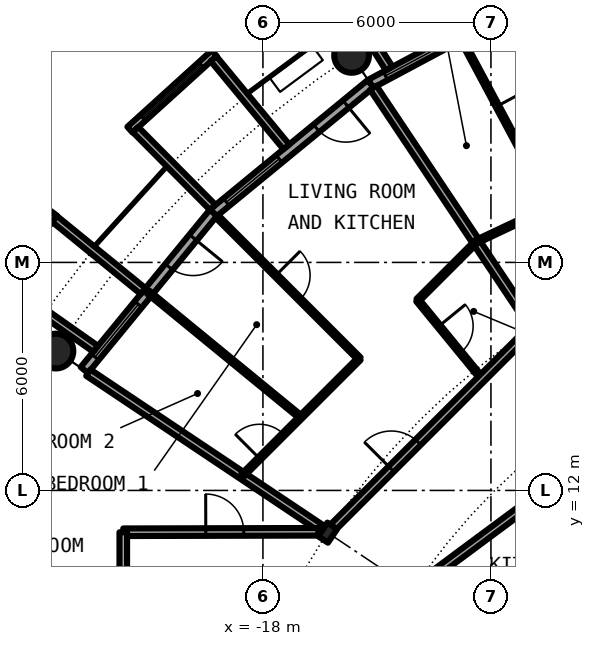
"""IFC4 building model, lengths in metres.
Left out: names, types, materials, properties, quantities, classifications, styles, units other than length and angle.
Written with IfcOpenShell. Run it as: python <this file> out.ifc"""

import sys

from ifc_helpers import new_model, si_unit, direction, frame, frame_2d, origin, origin_2d, place, context, subcontext, project, spatial, rectangle, circle, hollow_circle, i_section, extrude, element, fill, save


model = new_model("IFC4")
c1 = context("Model", 3, precision=1e-05, world=origin(), true_north=direction((0.0, 1.0)))
c2 = subcontext(c1, "Body", "Model", "MODEL_VIEW")
j1 = project(units=[si_unit("LENGTHUNIT", "METRE"), si_unit("PLANEANGLEUNIT", "RADIAN")], contexts=[c1])
p1 = place(None, origin())
s1 = spatial("IfcSite", under=j1, at=p1, CompositionType="ELEMENT")
p2 = place(p1, origin())
s2 = spatial("IfcBuilding", under=s1, at=p2, CompositionType="ELEMENT")
p3 = place(p2, frame((0.0, 0.0, 120.8)))
s3 = spatial("IfcBuildingStorey", under=s2, at=p3, CompositionType="ELEMENT", Elevation=120.8)
for number, where, z_axis, x_axis in (
    (1, (-15.667, 23.448, 0.0), (0.0, 0.0, 1.0), (1.0, 0.0, 0.0)),
    (2, (-23.448, 15.667, 0.0), (0.0, 0.0, 1.0), (1.0, 0.0, 0.0)),
):
    element("IfcColumn", number, at=place(p3, frame(where, z_axis=z_axis, x_axis=x_axis)), inside=s3, PredefinedType="COLUMN", context=c2, shape_type="SweptSolid", body=[
        extrude(hollow_circle(Radius=0.457, WallThickness=0.04, at=origin_2d()), origin(), (0.0, 0.0, 1.0), 3.05),
    ])
p4 = place(p3, frame((-16.297, 10.889, 0.0), z_axis=(0.0, 0.0, 1.0), x_axis=(-0.831469612303, 0.55557023302, 0.0)))
e3 = element("IfcColumn", 3, at=p4, inside=s3, PredefinedType="COLUMN", context=c2, shape_type="SweptSolid", body=[
    extrude(i_section(OverallWidth=0.307, OverallDepth=0.432, WebThickness=0.021, FlangeThickness=0.04, FilletRadius=0.027, at=origin_2d()), origin(), (0.0, 0.0, 1.0), 3.05),
])
p5 = place(p3, frame((-10.447, 25.222, 0.0), z_axis=(0.0, 0.0, 1.0), x_axis=(-0.881915646801, -0.471407246368, 0.0)))
e4 = element("IfcWall", 4, at=p5, inside=s3, PredefinedType="SOLIDWALL", context=c2, shape_type="SweptSolid", body=[
    extrude(rectangle(XDim=5.352, YDim=0.25, at=frame_2d((2.676, 0.0))), origin(), (0.0, 0.0, 1.0), 2.7),
])
p6 = place(p5, frame((0.841, 0.0, 0.0)))
e5 = element("IfcOpeningElement", 5, at=p6, cuts=e4, PredefinedType="OPENING", context=c2, shape_type="SweptSolid", body=[
    extrude(rectangle(XDim=1.0, YDim=2.2, at=frame_2d((0.5, 1.1))), frame((0.0, 0.135, 0.0), z_axis=(0.0, -1.0, 0.0), x_axis=(1.0, 0.0, 0.0)), (0.0, 0.0, 1.0), 0.27),
])
p7 = place(p5, frame((3.111, 0.0, 0.3)))
e6 = element("IfcOpeningElement", 6, at=p7, cuts=e4, PredefinedType="OPENING", context=c2, shape_type="SweptSolid", body=[
    extrude(rectangle(XDim=1.8, YDim=2.1, at=frame_2d((0.9, 1.05))), frame((0.0, 0.135, 0.0), z_axis=(0.0, -1.0, 0.0), x_axis=(1.0, 0.0, 0.0)), (0.0, 0.0, 1.0), 0.27),
])
p8 = place(p3, frame((-14.678, 23.102, -0.03), z_axis=(0.0, 0.0, 1.0), x_axis=(-0.536001536573, 0.844217005746, 0.0)))
e7 = element("IfcWall", 7, at=p8, inside=s3, PredefinedType="SOLIDWALL", context=c2, shape_type="SweptSolid", body=[
    extrude(rectangle(XDim=2.929, YDim=0.2, at=frame_2d((1.465, 0.0))), origin(), (0.0, 0.0, 1.0), 2.73),
])
p9 = place(p3, frame((-15.167, 22.699, 0.0), z_axis=(0.0, 0.0, 1.0), x_axis=(-0.773019449054, -0.634382322723, 0.0)))
e8 = element("IfcWall", 8, at=p9, inside=s3, PredefinedType="SOLIDWALL", context=c2, shape_type="SweptSolid", body=[
    extrude(rectangle(XDim=5.352, YDim=0.25, at=frame_2d((2.676, 0.0))), origin(), (0.0, 0.0, 1.0), 2.7),
])
p10 = place(p9, frame((0.841, 0.0, 0.0)))
e9 = element("IfcOpeningElement", 9, at=p10, cuts=e8, PredefinedType="OPENING", context=c2, shape_type="SweptSolid", body=[
    extrude(rectangle(XDim=1.0, YDim=2.2, at=frame_2d((0.5, 1.1))), frame((0.0, 0.135, 0.0), z_axis=(0.0, -1.0, 0.0), x_axis=(1.0, 0.0, 0.0)), (0.0, 0.0, 1.0), 0.27),
])
p11 = place(p9, frame((3.111, 0.0, 0.3)))
e10 = element("IfcOpeningElement", 10, at=p11, cuts=e8, PredefinedType="OPENING", context=c2, shape_type="SweptSolid", body=[
    extrude(rectangle(XDim=1.8, YDim=2.1, at=frame_2d((0.9, 1.05))), frame((0.0, 0.135, 0.0), z_axis=(0.0, -1.0, 0.0), x_axis=(1.0, 0.0, 0.0)), (0.0, 0.0, 1.0), 0.27),
])
p12 = place(p3, frame((-19.282, 23.503, -0.03), z_axis=(0.0, 0.0, 1.0), x_axis=(-0.740998365753, -0.671506829416, 0.0)))
e11 = element("IfcWall", 11, at=p12, inside=s3, PredefinedType="SOLIDWALL", context=c2, shape_type="SweptSolid", body=[
    extrude(rectangle(XDim=2.993, YDim=0.2, at=frame_2d((1.497, 0.0))), origin(), (0.0, 0.0, 1.0), 2.73),
])
p13 = place(p12, frame((0.457, 0.0, 0.33)))
e12 = element("IfcOpeningElement", 12, at=p13, cuts=e11, PredefinedType="OPENING", context=c2, shape_type="SweptSolid", body=[
    extrude(circle(Radius=1.04, at=frame_2d((1.04, 1.04))), frame((0.0, 0.11, 0.0), z_axis=(0.0, -1.0, 0.0), x_axis=(1.0, 0.0, 0.0)), (0.0, 0.0, 1.0), 0.22),
])
p14 = place(p3, frame((-17.384, 21.041, -0.03), z_axis=(0.0, 0.0, 1.0), x_axis=(-0.63709551667, 0.770784861449, 0.0)))
e13 = element("IfcWall", 13, at=p14, inside=s3, PredefinedType="SOLIDWALL", context=c2, shape_type="SweptSolid", body=[
    extrude(rectangle(XDim=3.006, YDim=0.2, at=frame_2d((1.503, 0.0))), origin(), (0.0, 0.0, 1.0), 2.73),
])
p15 = place(p3, frame((-19.323, 19.45, -0.03), z_axis=(0.0, 0.0, 1.0), x_axis=(-0.704476739375, 0.709727076896, 0.0)))
e14 = element("IfcWall", 14, at=p15, inside=s3, PredefinedType="SOLIDWALL", context=c2, shape_type="SweptSolid", body=[
    extrude(rectangle(XDim=2.883, YDim=0.2, at=frame_2d((1.441, 0.0))), origin(), (0.0, 0.0, 1.0), 2.73),
])
p16 = place(p3, frame((-19.304, 19.304, 0.0), z_axis=(0.0, 0.0, 1.0), x_axis=(-0.634382322723, -0.773019449054, 0.0)))
e15 = element("IfcWall", 15, at=p16, inside=s3, PredefinedType="SOLIDWALL", context=c2, shape_type="SweptSolid", body=[
    extrude(rectangle(XDim=5.352, YDim=0.25, at=frame_2d((2.676, 0.0))), origin(), (0.0, 0.0, 1.0), 2.7),
])
p17 = place(p16, frame((0.841, 0.0, 0.0)))
e16 = element("IfcOpeningElement", 16, at=p17, cuts=e15, PredefinedType="OPENING", context=c2, shape_type="SweptSolid", body=[
    extrude(rectangle(XDim=1.0, YDim=2.2, at=frame_2d((0.5, 1.1))), frame((0.0, 0.135, 0.0), z_axis=(0.0, -1.0, 0.0), x_axis=(1.0, 0.0, 0.0)), (0.0, 0.0, 1.0), 0.27),
])
p18 = place(p16, frame((3.111, 0.0, 0.3)))
e17 = element("IfcOpeningElement", 17, at=p18, cuts=e15, PredefinedType="OPENING", context=c2, shape_type="SweptSolid", body=[
    extrude(rectangle(XDim=1.8, YDim=2.1, at=frame_2d((0.9, 1.05))), frame((0.0, 0.135, 0.0), z_axis=(0.0, -1.0, 0.0), x_axis=(1.0, 0.0, 0.0)), (0.0, 0.0, 1.0), 0.27),
])
p19 = place(p3, frame((-23.497, 19.289, -0.03), z_axis=(0.0, 0.0, 1.0), x_axis=(-0.603375996329, -0.797456837111, 0.0)))
e18 = element("IfcWall", 18, at=p19, inside=s3, PredefinedType="SOLIDWALL", context=c2, shape_type="SweptSolid", body=[
    extrude(rectangle(XDim=2.391, YDim=0.2, at=frame_2d((1.196, 0.0))), origin(), (0.0, 0.0, 1.0), 2.73),
])
p20 = place(p19, frame((0.156, 0.0, 0.33)))
e19 = element("IfcOpeningElement", 19, at=p20, cuts=e18, PredefinedType="OPENING", context=c2, shape_type="SweptSolid", body=[
    extrude(circle(Radius=1.04, at=frame_2d((1.04, 1.04))), frame((0.0, 0.11, 0.0), z_axis=(0.0, -1.0, 0.0), x_axis=(1.0, 0.0, 0.0)), (0.0, 0.0, 1.0), 0.22),
])
p21 = place(p3, frame((-21.155, 17.246, -0.03), z_axis=(0.0, 0.0, 1.0), x_axis=(-0.775179004516, 0.631741648902, 0.0)))
e20 = element("IfcWall", 20, at=p21, inside=s3, PredefinedType="SOLIDWALL", context=c2, shape_type="SweptSolid", body=[
    extrude(rectangle(XDim=3.006, YDim=0.2, at=frame_2d((1.503, 0.0))), origin(), (0.0, 0.0, 1.0), 2.73),
])
p22 = place(p3, frame((-22.402, 15.726, -0.03), z_axis=(0.0, 0.0, 1.0), x_axis=(-0.818275399393, 0.574826383135, 0.0)))
e21 = element("IfcWall", 21, at=p22, inside=s3, PredefinedType="SOLIDWALL", context=c2, shape_type="SweptSolid", body=[
    extrude(rectangle(XDim=2.929, YDim=0.2, at=frame_2d((1.465, 0.0))), origin(), (0.0, 0.0, 1.0), 2.73),
])
p23 = place(p3, frame((-22.595, 15.098, 0.0), z_axis=(0.0, 0.0, 1.0), x_axis=(0.831406593008, -0.555664536482, 0.0)))
e22 = element("IfcWall", 22, at=p23, inside=s3, PredefinedType="PARTITIONING", context=c2, shape_type="SweptSolid", body=[
    extrude(rectangle(XDim=7.358, YDim=0.2, at=frame_2d((3.679, 0.0))), origin(), (0.0, 0.0, 1.0), 2.7),
])
p24 = place(p3, frame((-21.023, 17.22, 0.0), z_axis=(0.0, 0.0, 1.0), x_axis=(0.773517471898, -0.633774976367, 0.0)))
e23 = element("IfcWall", 23, at=p24, inside=s3, PredefinedType="PARTITIONING", context=c2, shape_type="SweptSolid", body=[
    extrude(rectangle(XDim=5.196, YDim=0.1, at=frame_2d((2.598, 0.0))), origin(), (0.0, 0.0, 1.0), 2.7),
])
p25 = place(p3, frame((-19.216, 19.216, 0.0), z_axis=(0.0, 0.0, 1.0), x_axis=(0.707106781187, -0.707106781187, 0.0)))
e24 = element("IfcWall", 24, at=p25, inside=s3, PredefinedType="PARTITIONING", context=c2, shape_type="SweptSolid", body=[
    extrude(rectangle(XDim=5.305, YDim=0.1, at=frame_2d((2.652, 0.0))), origin(), (0.0, 0.0, 1.0), 2.7),
])
p26 = place(p25, frame((2.202, 0.0, 0.0)))
e25 = element("IfcOpeningElement", 25, at=p26, cuts=e24, PredefinedType="OPENING", context=c2, shape_type="SweptSolid", body=[
    extrude(rectangle(XDim=0.9, YDim=2.3, at=frame_2d((0.45, 1.15))), frame((0.0, 0.06, 0.0), z_axis=(0.0, -1.0, 0.0), x_axis=(1.0, 0.0, 0.0)), (0.0, 0.0, 1.0), 0.12),
])
p27 = place(p3, frame((-15.097, 22.595, 0.0), z_axis=(0.0, 0.0, 1.0), x_axis=(0.555572791, -0.831467903109, 0.0)))
e26 = element("IfcWall", 26, at=p27, inside=s3, PredefinedType="PARTITIONING", context=c2, shape_type="SweptSolid", body=[
    extrude(rectangle(XDim=7.358, YDim=0.2, at=frame_2d((3.679, 0.0))), origin(), (0.0, 0.0, 1.0), 2.7),
])
p28 = place(p3, frame((-13.927, 17.004, 0.0), z_axis=(0.0, 0.0, 1.0), x_axis=(0.633582447834, -0.77367517848, 0.0)))
e27 = element("IfcWall", 27, at=p28, inside=s3, PredefinedType="PARTITIONING", context=c2, shape_type="SweptSolid", body=[
    extrude(rectangle(XDim=2.661, YDim=0.1, at=frame_2d((1.331, 0.0))), origin(), (0.0, 0.0, 1.0), 2.7),
])
p29 = place(p28, frame((0.881, 0.0, 0.0)))
e28 = element("IfcOpeningElement", 28, at=p29, cuts=e27, PredefinedType="OPENING", context=c2, shape_type="SweptSolid", body=[
    extrude(rectangle(XDim=0.9, YDim=2.3, at=frame_2d((0.45, 1.15))), frame((0.0, 0.06, 0.0), z_axis=(0.0, -1.0, 0.0), x_axis=(1.0, 0.0, 0.0)), (0.0, 0.0, 1.0), 0.12),
])
p30 = place(p3, frame((-12.82, 23.961, 0.0), z_axis=(0.0, 0.0, 1.0), x_axis=(0.471735511233, -0.881740101981, 0.0)))
e29 = element("IfcWall", 29, at=p30, inside=s3, PredefinedType="PARTITIONING", context=c2, shape_type="SweptSolid", body=[
    extrude(rectangle(XDim=5.09, YDim=0.1, at=frame_2d((2.545, 0.0))), origin(), (0.0, 0.0, 1.0), 2.7),
])
p31 = place(p30, frame((2.095, 0.0, 0.0)))
e30 = element("IfcOpeningElement", 30, at=p31, cuts=e29, PredefinedType="OPENING", context=c2, shape_type="SweptSolid", body=[
    extrude(rectangle(XDim=0.9, YDim=2.3, at=frame_2d((0.45, 1.15))), frame((0.0, 0.06, 0.0), z_axis=(0.0, -1.0, 0.0), x_axis=(1.0, 0.0, 0.0)), (0.0, 0.0, 1.0), 0.12),
])
p32 = place(p3, frame((-21.675, 10.9, 0.0), z_axis=(0.0, 0.0, 1.0), x_axis=(0.999997173357, 0.002377662213, 0.0)))
e31 = element("IfcWall", 31, at=p32, inside=s3, PredefinedType="PARTITIONING", context=c2, shape_type="SweptSolid", body=[
    extrude(rectangle(XDim=5.134, YDim=0.2, at=frame_2d((2.567, 0.0))), origin(), (0.0, 0.0, 1.0), 2.7),
])
p33 = place(p32, frame((2.171, 0.0, 0.0)))
e32 = element("IfcOpeningElement", 32, at=p33, cuts=e31, PredefinedType="OPENING", context=c2, shape_type="SweptSolid", body=[
    extrude(rectangle(XDim=1.0, YDim=2.3, at=frame_2d((0.5, 1.15))), frame((0.0, 0.11, 0.0), z_axis=(0.0, -1.0, 0.0), x_axis=(1.0, 0.0, 0.0)), (0.0, 0.0, 1.0), 0.22),
])
p34 = place(p3, frame((-14.052, 9.389, 0.0), z_axis=(0.0, 0.0, 1.0), x_axis=(0.803204584823, 0.59570327758, 0.0)))
e33 = element("IfcWall", 33, at=p34, inside=s3, PredefinedType="PARTITIONING", context=c2, shape_type="SweptSolid", body=[
    extrude(rectangle(XDim=11.387, YDim=0.2, at=frame_2d((5.693, 0.0))), origin(), (0.0, 0.0, 1.0), 2.7),
])
p35 = place(p34, frame((6.007, 0.0, 0.0)))
e34 = element("IfcOpeningElement", 34, at=p35, cuts=e33, PredefinedType="OPENING", context=c2, shape_type="SweptSolid", body=[
    extrude(rectangle(XDim=1.0, YDim=2.3, at=frame_2d((0.5, 1.15))), frame((0.0, 0.11, 0.0), z_axis=(0.0, -1.0, 0.0), x_axis=(1.0, 0.0, 0.0)), (0.0, 0.0, 1.0), 0.22),
])
p36 = place(p3, frame((-16.186, 11.0, 0.0), z_axis=(0.0, 0.0, 1.0), x_axis=(0.707106781187, 0.707106781187, 0.0)))
e35 = element("IfcWall", 35, at=p36, inside=s3, PredefinedType="PARTITIONING", context=c2, shape_type="SweptSolid", body=[
    extrude(rectangle(XDim=7.334, YDim=0.2, at=frame_2d((3.667, 0.0))), origin(), (0.0, 0.0, 1.0), 2.39),
])
p37 = place(p36, frame((2.211, 0.0, 0.0)))
e36 = element("IfcOpeningElement", 36, at=p37, cuts=e35, PredefinedType="OPENING", context=c2, shape_type="SweptSolid", body=[
    extrude(rectangle(XDim=1.0, YDim=2.3, at=frame_2d((0.5, 1.15))), frame((0.0, 0.11, 0.0), z_axis=(0.0, -1.0, 0.0), x_axis=(1.0, 0.0, 0.0)), (0.0, 0.0, 1.0), 0.22),
])
p38 = place(p3, frame((-21.675, 9.2, 0.0), z_axis=(0.0, 0.0, 1.0), x_axis=(0.0, 1.0, 0.0)))
e37 = element("IfcWall", 37, at=p38, inside=s3, PredefinedType="PARTITIONING", context=c2, shape_type="SweptSolid", body=[
    extrude(rectangle(XDim=1.7, YDim=0.2, at=frame_2d((0.85, 0.0))), origin(), (0.0, 0.0, 1.0), 2.7),
])
p39 = place(p3, frame((-18.542, 12.389, 0.0), z_axis=(0.0, 0.0, 1.0), x_axis=(0.707190945535, 0.707022606819, 0.0)))
e38 = element("IfcWall", 38, at=p39, inside=s3, PredefinedType="PARTITIONING", context=c2, shape_type="SweptSolid", body=[
    extrude(rectangle(XDim=4.351, YDim=0.1, at=frame_2d((2.175, 0.0))), origin(), (0.0, 0.0, 1.0), 2.7),
])
p40 = place(p39, frame((0.639, 0.0, 0.0)))
e39 = element("IfcOpeningElement", 39, at=p40, cuts=e38, PredefinedType="OPENING", context=c2, shape_type="SweptSolid", body=[
    extrude(rectangle(XDim=0.9, YDim=2.3, at=frame_2d((0.45, 1.15))), frame((0.0, 0.06, 0.0), z_axis=(0.0, -1.0, 0.0), x_axis=(1.0, 0.0, 0.0)), (0.0, 0.0, 1.0), 0.12),
])
p41 = place(p3, frame((-13.924, 17.006, 0.0), z_axis=(0.0, 0.0, 1.0), x_axis=(0.707387256653, 0.706826194425, 0.0)))
e40 = element("IfcWall", 40, at=p41, inside=s3, PredefinedType="PARTITIONING", context=c2, shape_type="SweptSolid", body=[
    extrude(rectangle(XDim=2.176, YDim=0.1, at=frame_2d((1.088, 0.0))), origin(), (0.0, 0.0, 1.0), 2.7),
])
p42 = place(p3, frame((-12.389, 18.542, 0.0), z_axis=(0.0, 0.0, 1.0), x_axis=(0.904081702397, 0.427359655782, 0.0)))
e41 = element("IfcWall", 41, at=p42, inside=s3, PredefinedType="PARTITIONING", context=c2, shape_type="SweptSolid", body=[
    extrude(rectangle(XDim=2.181, YDim=0.1, at=frame_2d((1.091, 0.0))), origin(), (0.0, 0.0, 1.0), 2.7),
])
p43 = place(p7, origin())
e42 = element("IfcWindow", 42, at=p43, inside=s3, PartitioningType="SINGLE_PANEL", PredefinedType="WINDOW", context=c2, shape_type="SweptSolid", body=[
    extrude(rectangle(XDim=1.8, YDim=2.1, at=frame_2d((0.9, 1.05))), frame((0.0, 0.03, 0.0), z_axis=(0.0, -1.0, 0.0), x_axis=(1.0, 0.0, 0.0)), (0.0, 0.0, 1.0), 0.06),
])
fill(e6, e42)
p44 = place(p10, origin())
e43 = element("IfcDoor", 43, at=p44, inside=s3, OperationType="SINGLE_SWING_LEFT", PredefinedType="DOOR", context=c2, shape_type="SweptSolid", body=[
    extrude(rectangle(XDim=1.0, YDim=2.2, at=frame_2d((0.5, 1.1))), frame((0.0, 0.025, 0.0), z_axis=(0.0, -1.0, 0.0), x_axis=(1.0, 0.0, 0.0)), (0.0, 0.0, 1.0), 0.05),
])
fill(e9, e43)
p45 = place(p11, origin())
e44 = element("IfcWindow", 44, at=p45, inside=s3, PartitioningType="SINGLE_PANEL", PredefinedType="WINDOW", context=c2, shape_type="SweptSolid", body=[
    extrude(rectangle(XDim=1.8, YDim=2.1, at=frame_2d((0.9, 1.05))), frame((0.0, 0.03, 0.0), z_axis=(0.0, -1.0, 0.0), x_axis=(1.0, 0.0, 0.0)), (0.0, 0.0, 1.0), 0.06),
])
fill(e10, e44)
p46 = place(p13, origin())
e45 = element("IfcWindow", 45, at=p46, inside=s3, PartitioningType="SINGLE_PANEL", PredefinedType="WINDOW", context=c2, shape_type="SweptSolid", body=[
    extrude(circle(Radius=1.04, at=frame_2d((1.04, 1.04))), frame((0.0, 0.03, 0.0), z_axis=(0.0, -1.0, 0.0), x_axis=(1.0, 0.0, 0.0)), (0.0, 0.0, 1.0), 0.06),
])
fill(e12, e45)
p47 = place(p17, origin())
e46 = element("IfcDoor", 46, at=p47, inside=s3, OperationType="SINGLE_SWING_LEFT", PredefinedType="DOOR", context=c2, shape_type="SweptSolid", body=[
    extrude(rectangle(XDim=1.0, YDim=2.2, at=frame_2d((0.5, 1.1))), frame((0.0, 0.025, 0.0), z_axis=(0.0, -1.0, 0.0), x_axis=(1.0, 0.0, 0.0)), (0.0, 0.0, 1.0), 0.05),
])
fill(e16, e46)
p48 = place(p18, origin())
e47 = element("IfcWindow", 47, at=p48, inside=s3, PartitioningType="SINGLE_PANEL", PredefinedType="WINDOW", context=c2, shape_type="SweptSolid", body=[
    extrude(rectangle(XDim=1.8, YDim=2.1, at=frame_2d((0.9, 1.05))), frame((0.0, 0.03, 0.0), z_axis=(0.0, -1.0, 0.0), x_axis=(1.0, 0.0, 0.0)), (0.0, 0.0, 1.0), 0.06),
])
fill(e17, e47)
p49 = place(p31, origin())
e48 = element("IfcDoor", 48, at=p49, inside=s3, OperationType="SINGLE_SWING_RIGHT", PredefinedType="DOOR", context=c2, shape_type="SweptSolid", body=[
    extrude(rectangle(XDim=0.9, YDim=2.3, at=frame_2d((0.45, 1.15))), frame((0.0, 0.025, 0.0), z_axis=(0.0, -1.0, 0.0), x_axis=(1.0, 0.0, 0.0)), (0.0, 0.0, 1.0), 0.05),
])
fill(e30, e48)
p50 = place(p37, origin())
e49 = element("IfcDoor", 49, at=p50, inside=s3, OperationType="SINGLE_SWING_LEFT", PredefinedType="DOOR", context=c2, shape_type="SweptSolid", body=[
    extrude(rectangle(XDim=1.0, YDim=2.3, at=frame_2d((0.5, 1.15))), frame((0.0, 0.025, 0.0), z_axis=(0.0, -1.0, 0.0), x_axis=(1.0, 0.0, 0.0)), (0.0, 0.0, 1.0), 0.05),
])
fill(e36, e49)
p51 = place(p29, origin())
e50 = element("IfcDoor", 50, at=p51, inside=s3, OperationType="SINGLE_SWING_RIGHT", PredefinedType="DOOR", context=c2, shape_type="SweptSolid", body=[
    extrude(rectangle(XDim=0.9, YDim=2.3, at=frame_2d((0.45, 1.15))), frame((0.0, 0.025, 0.0), z_axis=(0.0, -1.0, 0.0), x_axis=(1.0, 0.0, 0.0)), (0.0, 0.0, 1.0), 0.05),
])
fill(e28, e50)
p52 = place(p26, origin())
e51 = element("IfcDoor", 51, at=p52, inside=s3, OperationType="SINGLE_SWING_LEFT", PredefinedType="DOOR", context=c2, shape_type="SweptSolid", body=[
    extrude(rectangle(XDim=0.9, YDim=2.3, at=frame_2d((0.45, 1.15))), frame((0.0, 0.025, 0.0), z_axis=(0.0, -1.0, 0.0), x_axis=(1.0, 0.0, 0.0)), (0.0, 0.0, 1.0), 0.05),
])
fill(e25, e51)
p53 = place(p40, origin())
e52 = element("IfcDoor", 52, at=p53, inside=s3, OperationType="SINGLE_SWING_LEFT", PredefinedType="DOOR", context=c2, shape_type="SweptSolid", body=[
    extrude(rectangle(XDim=0.9, YDim=2.3, at=frame_2d((0.45, 1.15))), frame((0.0, 0.025, 0.0), z_axis=(0.0, -1.0, 0.0), x_axis=(1.0, 0.0, 0.0)), (0.0, 0.0, 1.0), 0.05),
])
fill(e39, e52)
p54 = place(p33, origin())
e53 = element("IfcDoor", 53, at=p54, inside=s3, OperationType="SINGLE_SWING_RIGHT", PredefinedType="DOOR", context=c2, shape_type="SweptSolid", body=[
    extrude(rectangle(XDim=1.0, YDim=2.3, at=frame_2d((0.5, 1.15))), frame((0.0, 0.025, 0.0), z_axis=(0.0, -1.0, 0.0), x_axis=(1.0, 0.0, 0.0)), (0.0, 0.0, 1.0), 0.05),
])
fill(e32, e53)
save(model, sys.argv[1])
